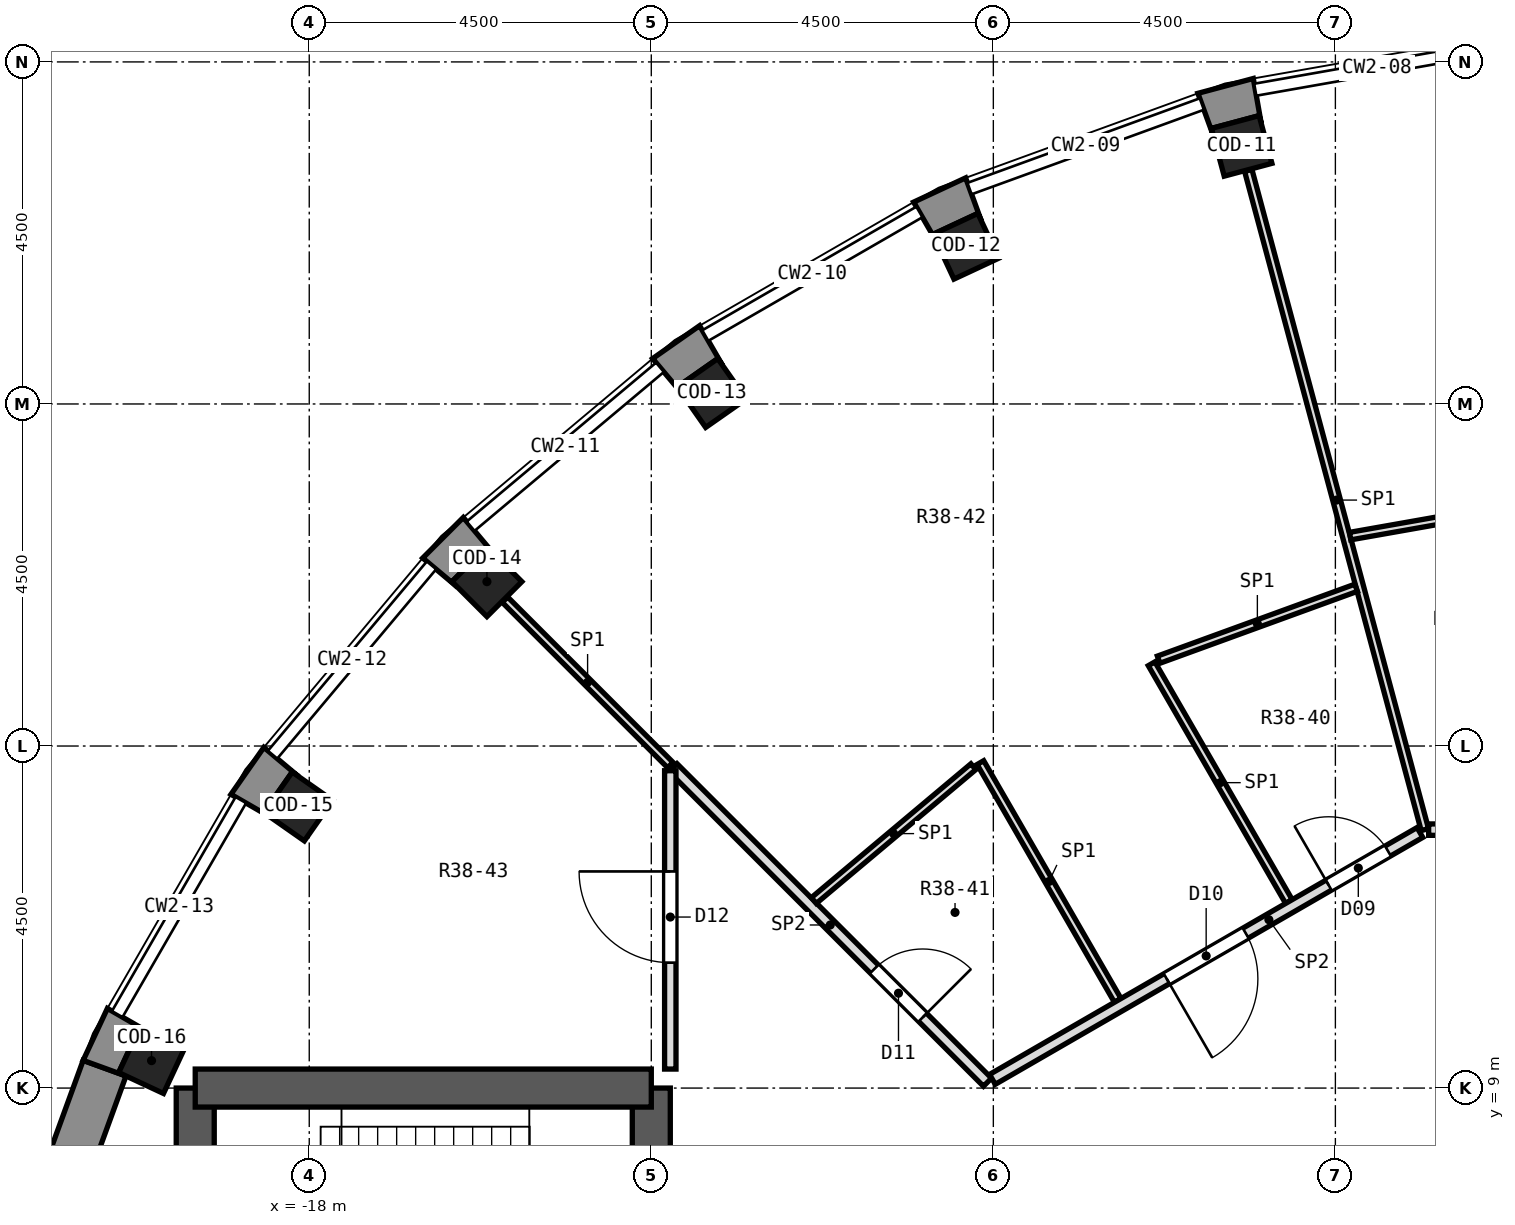
"""IFC4 building model, lengths in metres.
Left out: names, types, materials, properties, quantities, classifications, styles, units other than length and angle.
Written with IfcOpenShell. Run it as: python <this file> out.ifc"""

import sys

from ifc_helpers import new_model, si_unit, direction, frame, frame_2d, origin, origin_2d, place, context, subcontext, project, spatial, polyline, rectangle, outline, extrude, element, fill, save


model = new_model("IFC4")
c1 = context("Model", 3, precision=1e-05, world=origin(), true_north=direction((0.0, 1.0)))
c2 = subcontext(c1, "Body", "Model", "MODEL_VIEW")
j1 = project(units=[si_unit("LENGTHUNIT", "METRE"), si_unit("PLANEANGLEUNIT", "RADIAN")], contexts=[c1])
p1 = place(None, origin())
s1 = spatial("IfcSite", under=j1, at=p1, CompositionType="ELEMENT")
p2 = place(p1, origin())
s2 = spatial("IfcBuilding", under=s1, at=p2, CompositionType="ELEMENT")
p3 = place(p2, frame((0.0, 0.0, 279.2)))
s3 = spatial("IfcBuildingStorey", under=s2, at=p3, CompositionType="ELEMENT", Elevation=279.2)
for number, where, z_axis, x_axis in (
    (1, (-5.733, 21.395, 0.0), (0.0, 0.0, 1.0), (-0.259, 0.966, 0.0)),
    (2, (-9.361, 20.075, 0.0), (0.0, 0.0, 1.0), (-0.423, 0.906, 0.0)),
    (3, (-12.705, 18.144, 0.0), (0.0, 0.0, 1.0), (-0.574, 0.819, 0.0)),
    (4, (-15.662, 15.662, 0.0), (0.0, 0.0, 1.0), (-0.707, 0.707, 0.0)),
    (5, (-18.144, 12.705, 0.0), (0.0, 0.0, 1.0), (-0.819, 0.574, 0.0)),
    (6, (-20.075, 9.361, 0.0), (0.0, 0.0, 1.0), (-0.906, 0.423, 0.0)),
):
    element("IfcColumn", number, at=place(p3, frame(where, z_axis=z_axis, x_axis=x_axis)), inside=s3, PredefinedType="COLUMN", context=c2, shape_type="SweptSolid", body=[
        extrude(rectangle(XDim=0.65, YDim=0.65, at=origin_2d()), origin(), (0.0, 0.0, 1.0), 5.0),
    ])
p4 = place(p3, frame((-13.5, -9.0, 0.0), z_axis=(0.0, 0.0, 1.0), x_axis=(0.0, 1.0, 0.0)))
e7 = element("IfcWall", 7, at=p4, inside=s3, PredefinedType="SHEAR", context=c2, shape_type="SweptSolid", body=[
    extrude(rectangle(XDim=18.0, YDim=0.5, at=frame_2d((9.0, 0.0))), origin(), (0.0, 0.0, 1.0), 5.0),
])
p5 = place(p4, frame((15.4, 0.0, 0.0)))
e8 = element("IfcOpeningElement", 8, at=p5, cuts=e7, PredefinedType="OPENING", context=c2, shape_type="SweptSolid", body=[
    extrude(rectangle(XDim=1.2, YDim=2.1, at=frame_2d((0.6, 1.05))), frame((0.0, 0.262, 0.0), z_axis=(0.0, -1.0, 0.0), x_axis=(1.0, 0.0, 0.0)), (0.0, 0.0, 1.0), 0.524),
])
p6 = place(p4, frame((1.4, 0.0, 0.0)))
e9 = element("IfcOpeningElement", 9, at=p6, cuts=e7, PredefinedType="OPENING", context=c2, shape_type="SweptSolid", body=[
    extrude(rectangle(XDim=1.2, YDim=2.1, at=frame_2d((0.6, 1.05))), frame((0.0, 0.262, 0.0), z_axis=(0.0, -1.0, 0.0), x_axis=(1.0, 0.0, 0.0)), (0.0, 0.0, 1.0), 0.524),
])
p7 = place(p4, frame((7.5, 0.0, 0.0)))
e10 = element("IfcOpeningElement", 10, at=p7, cuts=e7, PredefinedType="OPENING", context=c2, shape_type="SweptSolid", body=[
    extrude(rectangle(XDim=3.0, YDim=2.4, at=frame_2d((1.5, 1.2))), frame((0.0, 0.262, 0.0), z_axis=(0.0, -1.0, 0.0), x_axis=(1.0, 0.0, 0.0)), (0.0, 0.0, 1.0), 0.524),
])
p8 = place(p3, frame((-19.5, -9.0, 0.0), z_axis=(0.0, 0.0, 1.0), x_axis=(0.0, 1.0, 0.0)))
e11 = element("IfcWall", 11, at=p8, inside=s3, PredefinedType="SHEAR", context=c2, shape_type="SweptSolid", body=[
    extrude(rectangle(XDim=18.0, YDim=0.5, at=frame_2d((9.0, 0.0))), origin(), (0.0, 0.0, 1.0), 5.0),
])
p9 = place(p8, frame((9.45, 0.0, 0.0)))
e12 = element("IfcOpeningElement", 12, at=p9, cuts=e11, PredefinedType="OPENING", context=c2, shape_type="SweptSolid", body=[
    extrude(rectangle(XDim=0.9, YDim=2.1, at=frame_2d((0.45, 1.05))), frame((0.0, 0.262, 0.0), z_axis=(0.0, -1.0, 0.0), x_axis=(1.0, 0.0, 0.0)), (0.0, 0.0, 1.0), 0.524),
])
p10 = place(p8, frame((7.65, 0.0, 0.0)))
e13 = element("IfcOpeningElement", 13, at=p10, cuts=e11, PredefinedType="OPENING", context=c2, shape_type="SweptSolid", body=[
    extrude(rectangle(XDim=0.9, YDim=2.1, at=frame_2d((0.45, 1.05))), frame((0.0, 0.262, 0.0), z_axis=(0.0, -1.0, 0.0), x_axis=(1.0, 0.0, 0.0)), (0.0, 0.0, 1.0), 0.524),
])
p11 = place(p3, frame((-13.5, 9.0, 0.0), z_axis=(0.0, 0.0, 1.0), x_axis=(-1.0, 0.0, 0.0)))
e14 = element("IfcWall", 14, at=p11, inside=s3, PredefinedType="SHEAR", context=c2, shape_type="SweptSolid", body=[
    extrude(rectangle(XDim=6.0, YDim=0.5, at=frame_2d((3.0, 0.0))), origin(), (0.0, 0.0, 1.0), 5.0),
])
p12 = place(p3, frame((-20.693, 9.262, 0.0), z_axis=(0.0, 0.0, 1.0), x_axis=(-0.342056509473, -0.939679383794, 0.0)))
e15 = element("IfcWall", 15, at=p12, inside=s3, PredefinedType="SOLIDWALL", context=c2, shape_type="SweptSolid", body=[
    extrude(rectangle(XDim=3.252, YDim=0.6, at=frame_2d((1.626, 0.0))), origin(), (0.0, 0.0, 1.0), 4.45),
])
p13 = place(p3, origin())
e16 = element("IfcWall", 16, at=p13, inside=s3, PredefinedType="SOLIDWALL", context=c2, shape_type="SweptSolid", body=[
    extrude(outline(polyline([(-6.309, 22.087), (-6.104, 21.523), (-6.131, 21.625), (-5.503, 21.793), (-5.476, 21.691), (-5.58, 22.282), (-6.309, 22.087)])), origin(), (0.0, 0.0, 1.0), 4.45),
])
p14 = place(p3, origin())
e17 = element("IfcWall", 17, at=p14, inside=s3, PredefinedType="SOLIDWALL", context=c2, shape_type="SweptSolid", body=[
    extrude(outline(polyline([(-9.364, 20.975), (-10.048, 20.656), (-9.748, 20.136), (-9.793, 20.232), (-9.204, 20.507), (-9.159, 20.411), (-9.364, 20.975)])), origin(), (0.0, 0.0, 1.0), 4.45),
])
p15 = place(p3, origin())
e18 = element("IfcWall", 18, at=p15, inside=s3, PredefinedType="SOLIDWALL", context=c2, shape_type="SweptSolid", body=[
    extrude(outline(polyline([(-12.864, 19.03), (-13.482, 18.597), (-13.097, 18.137), (-13.157, 18.224), (-12.625, 18.597), (-12.564, 18.51), (-12.864, 19.03)])), origin(), (0.0, 0.0, 1.0), 4.45),
])
p16 = place(p3, origin())
e19 = element("IfcWall", 19, at=p16, inside=s3, PredefinedType="SOLIDWALL", context=c2, shape_type="SweptSolid", body=[
    extrude(outline(polyline([(-16.507, 15.973), (-16.047, 15.588), (-16.122, 15.662), (-15.662, 16.122), (-15.588, 16.047), (-15.973, 16.507), (-16.507, 15.973)])), origin(), (0.0, 0.0, 1.0), 4.45),
])
p17 = place(p3, origin())
e20 = element("IfcWall", 20, at=p17, inside=s3, PredefinedType="SOLIDWALL", context=c2, shape_type="SweptSolid", body=[
    extrude(outline(polyline([(-19.03, 12.864), (-18.51, 12.564), (-18.597, 12.625), (-18.224, 13.157), (-18.137, 13.097), (-18.597, 13.482), (-19.03, 12.864)])), origin(), (0.0, 0.0, 1.0), 4.45),
])
p18 = place(p3, origin())
e21 = element("IfcWall", 21, at=p18, inside=s3, PredefinedType="SOLIDWALL", context=c2, shape_type="SweptSolid", body=[
    extrude(outline(polyline([(-20.656, 10.048), (-20.975, 9.364), (-20.411, 9.159), (-20.507, 9.204), (-20.232, 9.793), (-20.136, 9.748), (-20.656, 10.048)])), origin(), (0.0, 0.0, 1.0), 4.45),
])
p19 = place(p3, frame((-5.646, 21.072, 0.0), z_axis=(0.0, 0.0, 1.0), x_axis=(0.258728835498, -0.965949993365, 0.0)))
e22 = element("IfcWall", 22, at=p19, inside=s3, PredefinedType="PARTITIONING", context=c2, shape_type="SweptSolid", body=[
    extrude(rectangle(XDim=8.978, YDim=0.1, at=frame_2d((4.489, 0.0))), origin(), (0.0, 0.0, 1.0), 4.45),
])
p20 = place(p3, frame((-9.17, 13.282, 0.0), z_axis=(0.0, 0.0, 1.0), x_axis=(0.49998372882, -0.866034797751, 0.0)))
e23 = element("IfcWall", 23, at=p20, inside=s3, PredefinedType="PARTITIONING", context=c2, shape_type="SweptSolid", body=[
    extrude(rectangle(XDim=3.613, YDim=0.1, at=frame_2d((1.806, 0.0))), origin(), (0.0, 0.0, 1.0), 4.45),
])
p21 = place(p3, frame((-6.918, 14.582, 0.0), z_axis=(0.0, 0.0, 1.0), x_axis=(0.500071521611, -0.865984106825, 0.0)))
e24 = element("IfcWall", 24, at=p21, inside=s3, PredefinedType="PARTITIONING", context=c2, shape_type="SweptSolid", body=[
    extrude(rectangle(XDim=3.612, YDim=0.1, at=frame_2d((1.806, 0.0))), origin(), (0.0, 0.0, 1.0), 4.45),
])
p22 = place(p3, frame((-15.426, 15.426, 0.0), z_axis=(0.0, 0.0, 1.0), x_axis=(0.707106781187, -0.707106781187, 0.0)))
e25 = element("IfcWall", 25, at=p22, inside=s3, PredefinedType="PARTITIONING", context=c2, shape_type="SweptSolid", body=[
    extrude(rectangle(XDim=3.077, YDim=0.1, at=frame_2d((1.538, 0.0))), origin(), (0.0, 0.0, 1.0), 4.45),
])
p23 = place(p3, frame((-13.215, 13.215, 0.0), z_axis=(0.0, 0.0, 1.0), x_axis=(0.707106781187, -0.707106781187, 0.0)))
e26 = element("IfcWall", 26, at=p23, inside=s3, PredefinedType="PARTITIONING", context=c2, shape_type="SweptSolid", body=[
    extrude(rectangle(XDim=5.852, YDim=0.15, at=frame_2d((2.926, 0.0))), origin(), (0.0, 0.0, 1.0), 4.45),
])
p24 = place(p23, frame((3.746, 0.0, 0.0)))
e27 = element("IfcOpeningElement", 27, at=p24, cuts=e26, PredefinedType="OPENING", context=c2, shape_type="SweptSolid", body=[
    extrude(rectangle(XDim=0.9, YDim=2.1, at=frame_2d((0.45, 1.05))), frame((0.0, 0.087, 0.0), z_axis=(0.0, -1.0, 0.0), x_axis=(1.0, 0.0, 0.0)), (0.0, 0.0, 1.0), 0.174),
])
p25 = place(p3, frame((-3.273, 12.4, 0.0), z_axis=(0.0, 0.0, 1.0), x_axis=(1.0, 0.0, 0.0)))
e28 = element("IfcWall", 28, at=p25, inside=s3, PredefinedType="PARTITIONING", context=c2, shape_type="SweptSolid", body=[
    extrude(rectangle(XDim=6.521, YDim=0.15, at=frame_2d((3.26, 0.0))), origin(), (0.0, 0.0, 1.0), 4.45),
])
p26 = place(p25, frame((5.235, 0.0, 0.0)))
e29 = element("IfcOpeningElement", 29, at=p26, cuts=e28, PredefinedType="OPENING", context=c2, shape_type="SweptSolid", body=[
    extrude(rectangle(XDim=0.9, YDim=2.1, at=frame_2d((0.45, 1.05))), frame((0.0, 0.087, 0.0), z_axis=(0.0, -1.0, 0.0), x_axis=(1.0, 0.0, 0.0)), (0.0, 0.0, 1.0), 0.174),
])
p27 = place(p25, frame((2.373, 0.0, 0.0)))
e30 = element("IfcOpeningElement", 30, at=p27, cuts=e28, PredefinedType="OPENING", context=c2, shape_type="SweptSolid", body=[
    extrude(rectangle(XDim=1.8, YDim=2.1, at=frame_2d((0.9, 1.05))), frame((0.0, 0.087, 0.0), z_axis=(0.0, -1.0, 0.0), x_axis=(1.0, 0.0, 0.0)), (0.0, 0.0, 1.0), 0.174),
])
p28 = place(p25, frame((0.412, 0.0, 0.0)))
e31 = element("IfcOpeningElement", 31, at=p28, cuts=e28, PredefinedType="OPENING", context=c2, shape_type="SweptSolid", body=[
    extrude(rectangle(XDim=0.9, YDim=2.1, at=frame_2d((0.45, 1.05))), frame((0.0, 0.087, 0.0), z_axis=(0.0, -1.0, 0.0), x_axis=(1.0, 0.0, 0.0)), (0.0, 0.0, 1.0), 0.174),
])
p29 = place(p3, frame((-4.306, 16.262, 0.0), z_axis=(0.0, 0.0, 1.0), x_axis=(0.984771480107, 0.173853766043, 0.0)))
e32 = element("IfcWall", 32, at=p29, inside=s3, PredefinedType="PARTITIONING", context=c2, shape_type="SweptSolid", body=[
    extrude(rectangle(XDim=2.849, YDim=0.1, at=frame_2d((1.425, 0.0))), origin(), (0.0, 0.0, 1.0), 4.45),
])
p30 = place(p3, frame((-6.825, 14.636, 0.0), z_axis=(0.0, 0.0, 1.0), x_axis=(0.939664442714, 0.342097552023, 0.0)))
e33 = element("IfcWall", 33, at=p30, inside=s3, PredefinedType="PARTITIONING", context=c2, shape_type="SweptSolid", body=[
    extrude(rectangle(XDim=2.765, YDim=0.1, at=frame_2d((1.382, 0.0))), origin(), (0.0, 0.0, 1.0), 4.45),
])
p31 = place(p3, frame((-9.012, 9.115, 0.0), z_axis=(0.0, 0.0, 1.0), x_axis=(0.865967095912, 0.5001009786, 0.0)))
e34 = element("IfcWall", 34, at=p31, inside=s3, PredefinedType="PARTITIONING", context=c2, shape_type="SweptSolid", body=[
    extrude(rectangle(XDim=6.495, YDim=0.15, at=frame_2d((3.248, 0.0))), origin(), (0.0, 0.0, 1.0), 4.45),
])
p32 = place(p31, frame((5.109, 0.0, 0.0)))
e35 = element("IfcOpeningElement", 35, at=p32, cuts=e34, PredefinedType="OPENING", context=c2, shape_type="SweptSolid", body=[
    extrude(rectangle(XDim=0.9, YDim=2.1, at=frame_2d((0.45, 1.05))), frame((0.0, 0.087, 0.0), z_axis=(0.0, -1.0, 0.0), x_axis=(1.0, 0.0, 0.0)), (0.0, 0.0, 1.0), 0.174),
])
p33 = place(p31, frame((2.647, 0.0, 0.0)))
e36 = element("IfcOpeningElement", 36, at=p33, cuts=e34, PredefinedType="OPENING", context=c2, shape_type="SweptSolid", body=[
    extrude(rectangle(XDim=1.2, YDim=2.1, at=frame_2d((0.6, 1.05))), frame((0.0, 0.087, 0.0), z_axis=(0.0, -1.0, 0.0), x_axis=(1.0, 0.0, 0.0)), (0.0, 0.0, 1.0), 0.174),
])
p34 = place(p3, frame((-11.362, 11.467, 0.0), z_axis=(0.0, 0.0, 1.0), x_axis=(0.766083955689, 0.6427405175, 0.0)))
e37 = element("IfcWall", 37, at=p34, inside=s3, PredefinedType="PARTITIONING", context=c2, shape_type="SweptSolid", body=[
    extrude(rectangle(XDim=2.74, YDim=0.1, at=frame_2d((1.37, 0.0))), origin(), (0.0, 0.0, 1.0), 4.45),
])
p35 = place(p3, frame((-13.25, 9.25, 0.0), z_axis=(0.0, 0.0, 1.0), x_axis=(0.0, 1.0, 0.0)))
e38 = element("IfcWall", 38, at=p35, inside=s3, PredefinedType="PARTITIONING", context=c2, shape_type="SweptSolid", body=[
    extrude(rectangle(XDim=3.925, YDim=0.15, at=frame_2d((1.962, 0.0))), origin(), (0.0, 0.0, 1.0), 4.45),
])
p36 = place(p35, frame((1.4, 0.0, 0.0)))
e39 = element("IfcOpeningElement", 39, at=p36, cuts=e38, PredefinedType="OPENING", context=c2, shape_type="SweptSolid", body=[
    extrude(rectangle(XDim=1.2, YDim=2.1, at=frame_2d((0.6, 1.05))), frame((0.0, 0.087, 0.0), z_axis=(0.0, -1.0, 0.0), x_axis=(1.0, 0.0, 0.0)), (0.0, 0.0, 1.0), 0.174),
])
p37 = place(p32, origin())
e40 = element("IfcDoor", 40, at=p37, inside=s3, OperationType="SINGLE_SWING_LEFT", PredefinedType="DOOR", context=c2, shape_type="SweptSolid", body=[
    extrude(rectangle(XDim=0.9, YDim=2.1, at=frame_2d((0.45, 1.05))), frame((0.0, 0.025, 0.0), z_axis=(0.0, -1.0, 0.0), x_axis=(1.0, 0.0, 0.0)), (0.0, 0.0, 1.0), 0.05),
])
fill(e35, e40)
p38 = place(p33, frame((1.2, 0.0, 0.0), z_axis=(0.0, 0.0, 1.0), x_axis=(-1.0, 0.0, 0.0)))
e41 = element("IfcDoor", 41, at=p38, inside=s3, OperationType="SINGLE_SWING_RIGHT", PredefinedType="DOOR", context=c2, shape_type="SweptSolid", body=[
    extrude(rectangle(XDim=1.2, YDim=2.1, at=frame_2d((0.6, 1.05))), frame((0.0, 0.025, 0.0), z_axis=(0.0, -1.0, 0.0), x_axis=(1.0, 0.0, 0.0)), (0.0, 0.0, 1.0), 0.05),
])
fill(e36, e41)
p39 = place(p24, origin())
e42 = element("IfcDoor", 42, at=p39, inside=s3, OperationType="SINGLE_SWING_RIGHT", PredefinedType="DOOR", context=c2, shape_type="SweptSolid", body=[
    extrude(rectangle(XDim=0.9, YDim=2.1, at=frame_2d((0.45, 1.05))), frame((0.0, 0.025, 0.0), z_axis=(0.0, -1.0, 0.0), x_axis=(1.0, 0.0, 0.0)), (0.0, 0.0, 1.0), 0.05),
])
fill(e27, e42)
p40 = place(p36, origin())
e43 = element("IfcDoor", 43, at=p40, inside=s3, OperationType="SINGLE_SWING_RIGHT", PredefinedType="DOOR", context=c2, shape_type="SweptSolid", body=[
    extrude(rectangle(XDim=1.2, YDim=2.1, at=frame_2d((0.6, 1.05))), frame((0.0, 0.025, 0.0), z_axis=(0.0, -1.0, 0.0), x_axis=(1.0, 0.0, 0.0)), (0.0, 0.0, 1.0), 0.05),
])
fill(e39, e43)
save(model, sys.argv[1])
